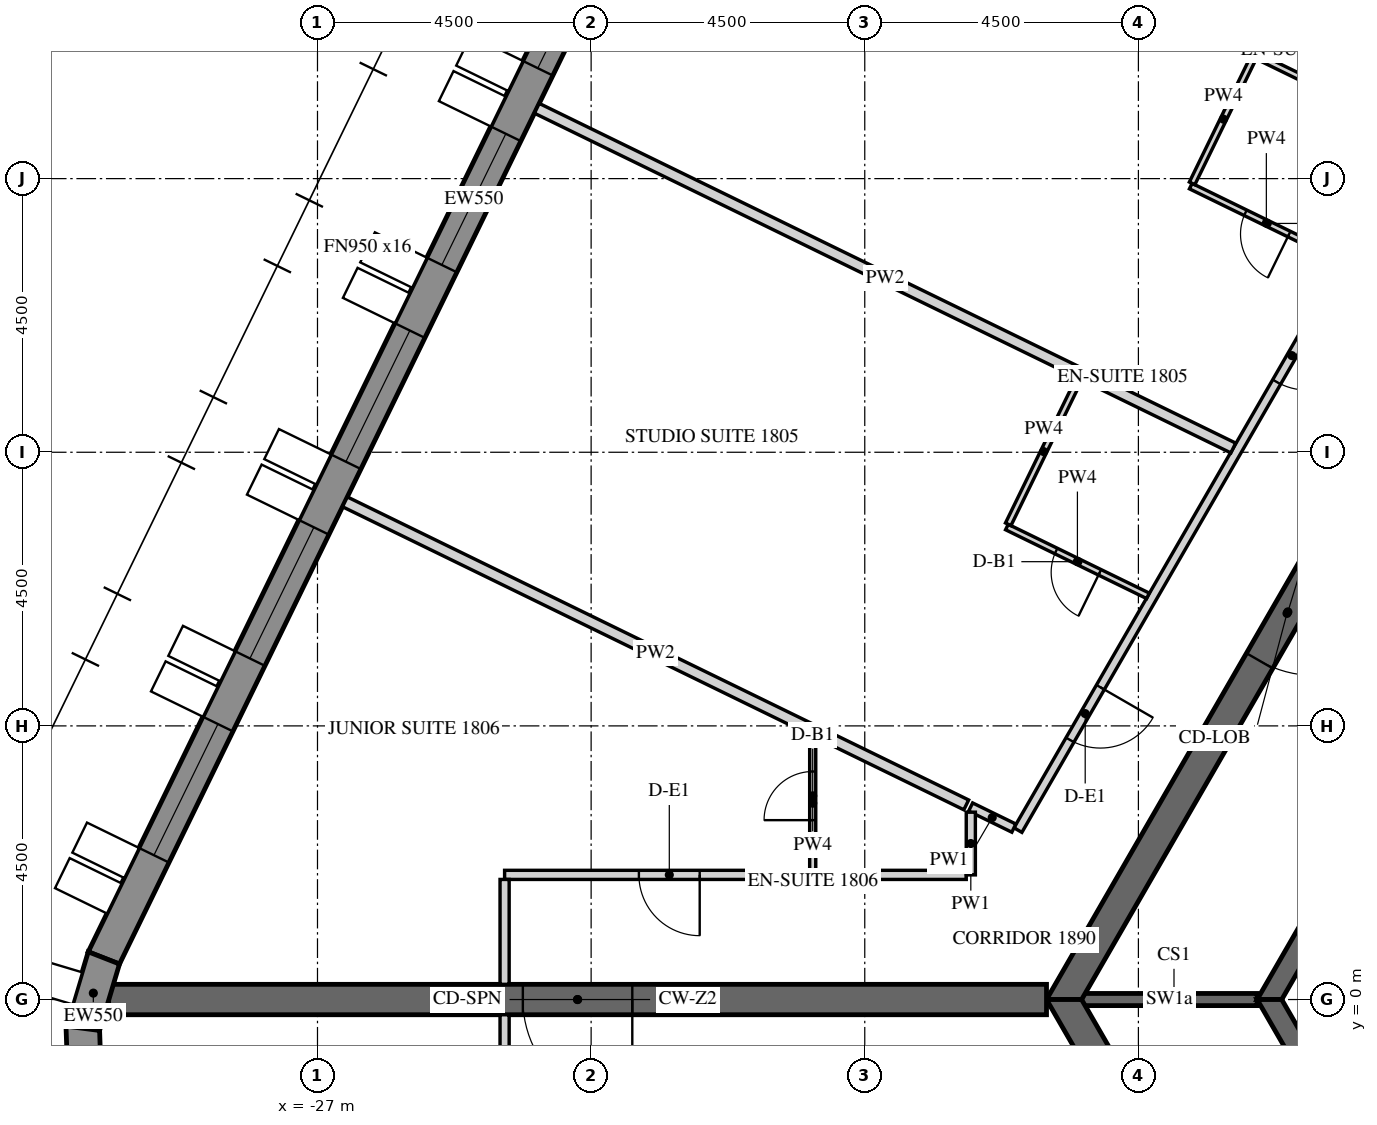
"""IFC4 building model, lengths in metres.
Left out: names, types, materials, properties, quantities, classifications, styles, units other than length and angle.
Written with IfcOpenShell. Run it as: python <this file> out.ifc"""

import sys

from ifc_helpers import new_model, si_unit, direction, frame, frame_2d, origin, place, context, subcontext, project, spatial, polyline, rectangle, outline, extrude, element, fill, save


model = new_model("IFC4")
c1 = context("Model", 3, precision=1e-05, world=origin(), true_north=direction((0.0, 1.0)))
c2 = subcontext(c1, "Body", "Model", "MODEL_VIEW")
j1 = project(units=[si_unit("LENGTHUNIT", "METRE"), si_unit("PLANEANGLEUNIT", "RADIAN")], contexts=[c1])
p1 = place(None, origin())
s1 = spatial("IfcSite", under=j1, at=p1, CompositionType="ELEMENT")
p2 = place(p1, origin())
s2 = spatial("IfcBuilding", under=s1, at=p2, CompositionType="ELEMENT")
p3 = place(p2, frame((0.0, 0.0, 226.8)))
s3 = spatial("IfcBuildingStorey", under=s2, at=p3, CompositionType="ELEMENT", Elevation=226.8)
p4 = place(p3, frame((-18.345, 25.633, -0.15), z_axis=(0.0, 0.0, 1.0), x_axis=(-0.43837181828, -0.898793718791, 0.0)))
e1 = element("IfcWall", 1, at=p4, inside=s3, PredefinedType="SOLIDWALL", context=c2, shape_type="SweptSolid", body=[
    extrude(outline(polyline([(-0.026, -0.275), (27.78, -0.275), (27.735, 0.275), (0.026, 0.275), (-0.026, -0.275)])), origin(), (0.0, 0.0, 1.0), 3.9),
])
p5 = place(p4, frame((1.879, 0.0, 1.05)))
e2 = element("IfcOpeningElement", 2, at=p5, cuts=e1, PredefinedType="OPENING", context=c2, shape_type="SweptSolid", body=[
    extrude(rectangle(XDim=2.4, YDim=2.4, at=frame_2d((1.2, 1.2))), frame((0.0, 0.285, 0.0), z_axis=(0.0, -1.0, 0.0), x_axis=(1.0, 0.0, 0.0)), (0.0, 0.0, 1.0), 0.57),
])
p6 = place(p4, frame((5.479, 0.0, 1.05)))
e3 = element("IfcOpeningElement", 3, at=p6, cuts=e1, PredefinedType="OPENING", context=c2, shape_type="SweptSolid", body=[
    extrude(rectangle(XDim=2.4, YDim=2.4, at=frame_2d((1.2, 1.2))), frame((0.0, 0.285, 0.0), z_axis=(0.0, -1.0, 0.0), x_axis=(1.0, 0.0, 0.0)), (0.0, 0.0, 1.0), 0.57),
])
p7 = place(p4, frame((9.079, 0.0, 1.05)))
e4 = element("IfcOpeningElement", 4, at=p7, cuts=e1, PredefinedType="OPENING", context=c2, shape_type="SweptSolid", body=[
    extrude(rectangle(XDim=2.4, YDim=2.4, at=frame_2d((1.2, 1.2))), frame((0.0, 0.285, 0.0), z_axis=(0.0, -1.0, 0.0), x_axis=(1.0, 0.0, 0.0)), (0.0, 0.0, 1.0), 0.57),
])
p8 = place(p4, frame((12.679, 0.0, 1.05)))
e5 = element("IfcOpeningElement", 5, at=p8, cuts=e1, PredefinedType="OPENING", context=c2, shape_type="SweptSolid", body=[
    extrude(rectangle(XDim=2.4, YDim=2.4, at=frame_2d((1.2, 1.2))), frame((0.0, 0.285, 0.0), z_axis=(0.0, -1.0, 0.0), x_axis=(1.0, 0.0, 0.0)), (0.0, 0.0, 1.0), 0.57),
])
p9 = place(p4, frame((16.279, 0.0, 1.05)))
e6 = element("IfcOpeningElement", 6, at=p9, cuts=e1, PredefinedType="OPENING", context=c2, shape_type="SweptSolid", body=[
    extrude(rectangle(XDim=2.4, YDim=2.4, at=frame_2d((1.2, 1.2))), frame((0.0, 0.285, 0.0), z_axis=(0.0, -1.0, 0.0), x_axis=(1.0, 0.0, 0.0)), (0.0, 0.0, 1.0), 0.57),
])
p10 = place(p4, frame((19.879, 0.0, 1.05)))
e7 = element("IfcOpeningElement", 7, at=p10, cuts=e1, PredefinedType="OPENING", context=c2, shape_type="SweptSolid", body=[
    extrude(rectangle(XDim=2.4, YDim=2.4, at=frame_2d((1.2, 1.2))), frame((0.0, 0.285, 0.0), z_axis=(0.0, -1.0, 0.0), x_axis=(1.0, 0.0, 0.0)), (0.0, 0.0, 1.0), 0.57),
])
p11 = place(p4, frame((23.479, 0.0, 1.05)))
e8 = element("IfcOpeningElement", 8, at=p11, cuts=e1, PredefinedType="OPENING", context=c2, shape_type="SweptSolid", body=[
    extrude(rectangle(XDim=2.4, YDim=2.4, at=frame_2d((1.2, 1.2))), frame((0.0, 0.285, 0.0), z_axis=(0.0, -1.0, 0.0), x_axis=(1.0, 0.0, 0.0)), (0.0, 0.0, 1.0), 0.57),
])
p12 = place(p3, frame((-30.513, 0.684, -0.15), z_axis=(0.0, 0.0, 1.0), x_axis=(-0.286736058109, -0.958009620505, 0.0)))
e9 = element("IfcWall", 9, at=p12, inside=s3, PredefinedType="SOLIDWALL", context=c2, shape_type="SweptSolid", body=[
    extrude(outline(polyline([(-0.022, -0.275), (1.253, -0.275), (1.163, 0.275), (0.022, 0.275), (-0.022, -0.275)])), origin(), (0.0, 0.0, 1.0), 3.9),
])
p13 = place(p3, frame((-30.86, -0.473, -0.15), z_axis=(0.0, 0.0, 1.0), x_axis=(0.03495638276, -0.999388838893, 0.0)))
e10 = element("IfcWall", 10, at=p13, inside=s3, PredefinedType="SOLIDWALL", context=c2, shape_type="SweptSolid", body=[
    extrude(outline(polyline([(-0.045, -0.275), (1.253, -0.275), (1.163, 0.275), (0.045, 0.275), (-0.045, -0.275)])), origin(), (0.0, 0.0, 1.0), 3.9),
])
p14 = place(p3, frame((-7.361, 12.75, -0.15), z_axis=(0.0, 0.0, 1.0), x_axis=(-0.50000571537, -0.866022103989, 0.0)))
e11 = element("IfcWall", 11, at=p14, inside=s3, PredefinedType="SHEAR", context=c2, shape_type="SweptSolid", body=[
    extrude(outline(polyline([(-0.144, -0.25), (14.867, -0.25), (14.578, 0.25), (0.144, 0.25), (-0.144, -0.25)])), origin(), (0.0, 0.0, 1.0), 3.9),
])
p15 = place(p14, frame((6.49, 0.0, 0.15)))
e12 = element("IfcOpeningElement", 12, at=p15, cuts=e11, PredefinedType="OPENING", context=c2, shape_type="SweptSolid", body=[
    extrude(rectangle(XDim=1.8, YDim=2.4, at=frame_2d((0.9, 1.2))), frame((0.0, 0.26, 0.0), z_axis=(0.0, -1.0, 0.0), x_axis=(1.0, 0.0, 0.0)), (0.0, 0.0, 1.0), 0.52),
])
p16 = place(p3, frame((-14.722, 0.0, -0.15), z_axis=(0.0, 0.0, 1.0), x_axis=(0.50000571537, -0.866022103989, 0.0)))
e13 = element("IfcWall", 13, at=p16, inside=s3, PredefinedType="SHEAR", context=c2, shape_type="SweptSolid", body=[
    extrude(outline(polyline([(-0.144, -0.25), (14.867, -0.25), (14.578, 0.25), (0.144, 0.25), (-0.144, -0.25)])), origin(), (0.0, 0.0, 1.0), 3.9),
])
p17 = place(p16, frame((6.432, 0.0, 0.15)))
e14 = element("IfcOpeningElement", 14, at=p17, cuts=e13, PredefinedType="OPENING", context=c2, shape_type="SweptSolid", body=[
    extrude(rectangle(XDim=1.8, YDim=2.4, at=frame_2d((0.9, 1.2))), frame((0.0, 0.26, 0.0), z_axis=(0.0, -1.0, 0.0), x_axis=(1.0, 0.0, 0.0)), (0.0, 0.0, 1.0), 0.52),
])
p18 = place(p3, frame((-15.011, 0.0, -0.15), z_axis=(0.0, 0.0, 1.0), x_axis=(-1.0, 0.0, 0.0)))
e15 = element("IfcWall", 15, at=p18, inside=s3, PredefinedType="SHEAR", context=c2, shape_type="SweptSolid", body=[
    extrude(rectangle(XDim=15.424, YDim=0.5, at=frame_2d((7.712, 0.0))), origin(), (0.0, 0.0, 1.0), 3.9),
])
p19 = place(p18, frame((6.812, 0.0, 0.15)))
e16 = element("IfcOpeningElement", 16, at=p19, cuts=e15, PredefinedType="OPENING", context=c2, shape_type="SweptSolid", body=[
    extrude(rectangle(XDim=1.8, YDim=2.4, at=frame_2d((0.9, 1.2))), frame((0.0, 0.26, 0.0), z_axis=(0.0, -1.0, 0.0), x_axis=(1.0, 0.0, 0.0)), (0.0, 0.0, 1.0), 0.52),
])
p20 = place(p3, frame((-5.673, 9.825, -0.15), z_axis=(0.0, 0.0, 1.0), x_axis=(-0.499995046907, -0.866028263435, 0.0)))
e17 = element("IfcWall", 17, at=p20, inside=s3, PredefinedType="SHEAR", context=c2, shape_type="SweptSolid", body=[
    extrude(outline(polyline([(-0.101, -0.175), (11.446, -0.175), (11.244, 0.175), (0.101, 0.175), (-0.101, -0.175)])), origin(), (0.0, 0.0, 1.0), 3.9),
])
p21 = place(p20, frame((4.801, 0.0, 0.15)))
e18 = element("IfcOpeningElement", 18, at=p21, cuts=e17, PredefinedType="OPENING", context=c2, shape_type="SweptSolid", body=[
    extrude(rectangle(XDim=1.8, YDim=2.4, at=frame_2d((0.9, 1.2))), frame((0.0, 0.185, 0.0), z_axis=(0.0, -1.0, 0.0), x_axis=(1.0, 0.0, 0.0)), (0.0, 0.0, 1.0), 0.37),
])
p22 = place(p3, frame((-11.345, 0.0, -0.15), z_axis=(0.0, 0.0, 1.0), x_axis=(0.499995046907, -0.866028263435, 0.0)))
e19 = element("IfcWall", 19, at=p22, inside=s3, PredefinedType="SHEAR", context=c2, shape_type="SweptSolid", body=[
    extrude(outline(polyline([(-0.101, -0.175), (11.446, -0.175), (11.244, 0.175), (0.101, 0.175), (-0.101, -0.175)])), origin(), (0.0, 0.0, 1.0), 3.9),
])
p23 = place(p22, frame((4.744, 0.0, 0.15)))
e20 = element("IfcOpeningElement", 20, at=p23, cuts=e19, PredefinedType="OPENING", context=c2, shape_type="SweptSolid", body=[
    extrude(rectangle(XDim=1.8, YDim=2.4, at=frame_2d((0.9, 1.2))), frame((0.0, 0.185, 0.0), z_axis=(0.0, -1.0, 0.0), x_axis=(1.0, 0.0, 0.0)), (0.0, 0.0, 1.0), 0.37),
])
p24 = place(p3, frame((-11.547, 0.0, -0.15), z_axis=(0.0, 0.0, 1.0), x_axis=(-1.0, 0.0, 0.0)))
e21 = element("IfcWall", 21, at=p24, inside=s3, PredefinedType="SHEAR", context=c2, shape_type="SweptSolid", body=[
    extrude(rectangle(XDim=2.887, YDim=0.2, at=frame_2d((1.443, 0.0))), origin(), (0.0, 0.0, 1.0), 3.9),
])
p25 = place(p3, frame((-8.588, 14.725, 0.0), z_axis=(0.0, 0.0, 1.0), x_axis=(-0.499999926766, -0.866025446066, 0.0)))
e22 = element("IfcWall", 22, at=p25, inside=s3, PredefinedType="PARTITIONING", context=c2, shape_type="SweptSolid", body=[
    extrude(rectangle(XDim=13.786, YDim=0.15, at=frame_2d((6.893, 0.0))), origin(), (0.0, 0.0, 1.0), 2.988),
])
p26 = place(p25, frame((4.276, 0.0, 0.0)))
e23 = element("IfcOpeningElement", 23, at=p26, cuts=e22, PredefinedType="OPENING", context=c2, shape_type="SweptSolid", body=[
    extrude(rectangle(XDim=1.0, YDim=2.1, at=frame_2d((0.5, 1.05))), frame((0.0, 0.085, 0.0), z_axis=(0.0, -1.0, 0.0), x_axis=(1.0, 0.0, 0.0)), (0.0, 0.0, 1.0), 0.17),
])
p27 = place(p25, frame((11.073, 0.0, 0.0)))
e24 = element("IfcOpeningElement", 24, at=p27, cuts=e22, PredefinedType="OPENING", context=c2, shape_type="SweptSolid", body=[
    extrude(rectangle(XDim=1.0, YDim=2.1, at=frame_2d((0.5, 1.05))), frame((0.0, 0.085, 0.0), z_axis=(0.0, -1.0, 0.0), x_axis=(1.0, 0.0, 0.0)), (0.0, 0.0, 1.0), 0.17),
])
p28 = place(p3, frame((-15.548, 2.819, 0.0), z_axis=(0.0, 0.0, 1.0), x_axis=(-0.898827767233, 0.438302001879, 0.0)))
e25 = element("IfcWall", 25, at=p28, inside=s3, PredefinedType="PARTITIONING", context=c2, shape_type="SweptSolid", body=[
    extrude(rectangle(XDim=0.791, YDim=0.15, at=frame_2d((0.396, 0.0))), origin(), (0.0, 0.0, 1.0), 2.988),
])
p29 = place(p3, frame((-16.331, 2.05, 0.0), z_axis=(0.0, 0.0, 1.0), x_axis=(-1.0, 0.0, 0.0)))
e26 = element("IfcWall", 26, at=p29, inside=s3, PredefinedType="PARTITIONING", context=c2, shape_type="SweptSolid", body=[
    extrude(rectangle(XDim=7.592, YDim=0.15, at=frame_2d((3.796, 0.0))), origin(), (0.0, 0.0, 1.0), 2.988),
])
p30 = place(p29, frame((4.384, 0.0, 0.0)))
e27 = element("IfcOpeningElement", 27, at=p30, cuts=e26, PredefinedType="OPENING", context=c2, shape_type="SweptSolid", body=[
    extrude(rectangle(XDim=1.0, YDim=2.1, at=frame_2d((0.5, 1.05))), frame((0.0, 0.085, 0.0), z_axis=(0.0, -1.0, 0.0), x_axis=(1.0, 0.0, 0.0)), (0.0, 0.0, 1.0), 0.17),
])
p31 = place(p3, frame((-23.923, 1.975, 0.0), z_axis=(0.0, 0.0, 1.0), x_axis=(0.0, -1.0, 0.0)))
e28 = element("IfcWall", 28, at=p31, inside=s3, PredefinedType="PARTITIONING", context=c2, shape_type="SweptSolid", body=[
    extrude(rectangle(XDim=1.725, YDim=0.15, at=frame_2d((0.863, 0.0))), origin(), (0.0, 0.0, 1.0), 2.988),
])
p32 = place(p3, frame((-16.256, 3.081, 0.0), z_axis=(0.0, 0.0, 1.0), x_axis=(0.0, -1.0, 0.0)))
e29 = element("IfcWall", 29, at=p32, inside=s3, PredefinedType="PARTITIONING", context=c2, shape_type="SweptSolid", body=[
    extrude(rectangle(XDim=1.031, YDim=0.15, at=frame_2d((0.516, 0.0))), origin(), (0.0, 0.0, 1.0), 2.988),
])
p33 = place(p3, frame((-23.923, -0.25, 0.0), z_axis=(0.0, 0.0, 1.0), x_axis=(0.0, -1.0, 0.0)))
e30 = element("IfcWall", 30, at=p33, inside=s3, PredefinedType="PARTITIONING", context=c2, shape_type="SweptSolid", body=[
    extrude(rectangle(XDim=1.8, YDim=0.15, at=frame_2d((0.9, 0.0))), origin(), (0.0, 0.0, 1.0), 2.988),
])
p34 = place(p3, frame((-16.791, 26.871, 0.0), z_axis=(0.0, 0.0, 1.0), x_axis=(0.529927950822, -0.848042668111, 0.0)))
e31 = element("IfcWall", 31, at=p34, inside=s3, PredefinedType="PARTITIONING", context=c2, shape_type="SweptSolid", body=[
    extrude(rectangle(XDim=14.839, YDim=0.18, at=frame_2d((7.419, 0.0))), origin(), (0.0, 0.0, 1.0), 2.988),
])
p35 = place(p3, frame((-10.153, 12.164, 0.0), z_axis=(0.0, 0.0, 1.0), x_axis=(-0.898780323471, 0.438399281638, 0.0)))
e32 = element("IfcWall", 32, at=p35, inside=s3, PredefinedType="PARTITIONING", context=c2, shape_type="SweptSolid", body=[
    extrude(rectangle(XDim=2.766, YDim=0.1, at=frame_2d((1.383, 0.0))), origin(), (0.0, 0.0, 1.0), 2.988),
])
p36 = place(p35, frame((0.966, 0.0, 0.0)))
e33 = element("IfcOpeningElement", 33, at=p36, cuts=e32, PredefinedType="OPENING", context=c2, shape_type="SweptSolid", body=[
    extrude(rectangle(XDim=0.8, YDim=2.1, at=frame_2d((0.4, 1.05))), frame((0.0, 0.06, 0.0), z_axis=(0.0, -1.0, 0.0), x_axis=(1.0, 0.0, 0.0)), (0.0, 0.0, 1.0), 0.12),
])
p37 = place(p3, frame((-12.617, 13.422, 0.0), z_axis=(0.0, 0.0, 1.0), x_axis=(0.438298773825, 0.898829341345, 0.0)))
e34 = element("IfcWall", 34, at=p37, inside=s3, PredefinedType="PARTITIONING", context=c2, shape_type="SweptSolid", body=[
    extrude(rectangle(XDim=2.35, YDim=0.1, at=frame_2d((1.175, 0.0))), origin(), (0.0, 0.0, 1.0), 2.988),
])
p38 = place(p3, frame((-11.542, 15.512, 0.0), z_axis=(0.0, 0.0, 1.0), x_axis=(0.898813033265, -0.438332215599, 0.0)))
e35 = element("IfcWall", 35, at=p38, inside=s3, PredefinedType="PARTITIONING", context=c2, shape_type="SweptSolid", body=[
    extrude(rectangle(XDim=2.789, YDim=0.1, at=frame_2d((1.395, 0.0))), origin(), (0.0, 0.0, 1.0), 2.988),
])
p39 = place(p3, frame((-23.393, 14.656, 0.0), z_axis=(0.0, 0.0, 1.0), x_axis=(0.898790356386, -0.438378712152, 0.0)))
e36 = element("IfcWall", 36, at=p39, inside=s3, PredefinedType="PARTITIONING", context=c2, shape_type="SweptSolid", body=[
    extrude(rectangle(XDim=12.743, YDim=0.18, at=frame_2d((6.372, 0.0))), origin(), (0.0, 0.0, 1.0), 2.988),
])
p40 = place(p3, frame((-13.343, 6.639, 0.0), z_axis=(0.0, 0.0, 1.0), x_axis=(-0.898792082907, 0.438375172318, 0.0)))
e37 = element("IfcWall", 37, at=p40, inside=s3, PredefinedType="PARTITIONING", context=c2, shape_type="SweptSolid", body=[
    extrude(rectangle(XDim=2.581, YDim=0.1, at=frame_2d((1.291, 0.0))), origin(), (0.0, 0.0, 1.0), 2.988),
])
p41 = place(p40, frame((0.881, 0.0, 0.0)))
e38 = element("IfcOpeningElement", 38, at=p41, cuts=e37, PredefinedType="OPENING", context=c2, shape_type="SweptSolid", body=[
    extrude(rectangle(XDim=0.8, YDim=2.1, at=frame_2d((0.4, 1.05))), frame((0.0, 0.06, 0.0), z_axis=(0.0, -1.0, 0.0), x_axis=(1.0, 0.0, 0.0)), (0.0, 0.0, 1.0), 0.12),
])
p42 = place(p3, frame((-15.641, 7.815, 0.0), z_axis=(0.0, 0.0, 1.0), x_axis=(0.438380229518, 0.898789616299, 0.0)))
e39 = element("IfcWall", 39, at=p42, inside=s3, PredefinedType="PARTITIONING", context=c2, shape_type="SweptSolid", body=[
    extrude(rectangle(XDim=2.66, YDim=0.1, at=frame_2d((1.33, 0.0))), origin(), (0.0, 0.0, 1.0), 2.988),
])
p43 = place(p3, frame((-26.549, 8.185, 0.0), z_axis=(0.0, 0.0, 1.0), x_axis=(0.898794655758, -0.438369897211, 0.0)))
e40 = element("IfcWall", 40, at=p43, inside=s3, PredefinedType="PARTITIONING", context=c2, shape_type="SweptSolid", body=[
    extrude(rectangle(XDim=11.369, YDim=0.18, at=frame_2d((5.684, 0.0))), origin(), (0.0, 0.0, 1.0), 2.988),
])
p44 = place(p3, frame((-18.856, 2.125, 0.0), z_axis=(0.0, 0.0, 1.0), x_axis=(0.0, 1.0, 0.0)))
e41 = element("IfcWall", 41, at=p44, inside=s3, PredefinedType="PARTITIONING", context=c2, shape_type="SweptSolid", body=[
    extrude(rectangle(XDim=2.207, YDim=0.1, at=frame_2d((1.104, 0.0))), origin(), (0.0, 0.0, 1.0), 2.988),
])
p45 = place(p44, frame((0.825, 0.0, 0.0)))
e42 = element("IfcOpeningElement", 42, at=p45, cuts=e41, PredefinedType="OPENING", context=c2, shape_type="SweptSolid", body=[
    extrude(rectangle(XDim=0.8, YDim=2.1, at=frame_2d((0.4, 1.05))), frame((0.0, 0.06, 0.0), z_axis=(0.0, -1.0, 0.0), x_axis=(1.0, 0.0, 0.0)), (0.0, 0.0, 1.0), 0.12),
])
p46 = place(p7, frame((0.0, 0.205, 0.0)))
e43 = element("IfcWindow", 43, at=p46, inside=s3, PartitioningType="DOUBLE_PANEL_VERTICAL", PredefinedType="WINDOW", context=c2, shape_type="SweptSolid", body=[
    extrude(rectangle(XDim=2.4, YDim=2.4, at=frame_2d((1.2, 1.2))), frame((0.0, 0.03, 0.0), z_axis=(0.0, -1.0, 0.0), x_axis=(1.0, 0.0, 0.0)), (0.0, 0.0, 1.0), 0.06),
])
fill(e4, e43)
p47 = place(p8, frame((0.0, 0.205, 0.0)))
e44 = element("IfcWindow", 44, at=p47, inside=s3, PartitioningType="DOUBLE_PANEL_VERTICAL", PredefinedType="WINDOW", context=c2, shape_type="SweptSolid", body=[
    extrude(rectangle(XDim=2.4, YDim=2.4, at=frame_2d((1.2, 1.2))), frame((0.0, 0.03, 0.0), z_axis=(0.0, -1.0, 0.0), x_axis=(1.0, 0.0, 0.0)), (0.0, 0.0, 1.0), 0.06),
])
fill(e5, e44)
p48 = place(p9, frame((0.0, 0.205, 0.0)))
e45 = element("IfcWindow", 45, at=p48, inside=s3, PartitioningType="DOUBLE_PANEL_VERTICAL", PredefinedType="WINDOW", context=c2, shape_type="SweptSolid", body=[
    extrude(rectangle(XDim=2.4, YDim=2.4, at=frame_2d((1.2, 1.2))), frame((0.0, 0.03, 0.0), z_axis=(0.0, -1.0, 0.0), x_axis=(1.0, 0.0, 0.0)), (0.0, 0.0, 1.0), 0.06),
])
fill(e6, e45)
p49 = place(p10, frame((0.0, 0.205, 0.0)))
e46 = element("IfcWindow", 46, at=p49, inside=s3, PartitioningType="DOUBLE_PANEL_VERTICAL", PredefinedType="WINDOW", context=c2, shape_type="SweptSolid", body=[
    extrude(rectangle(XDim=2.4, YDim=2.4, at=frame_2d((1.2, 1.2))), frame((0.0, 0.03, 0.0), z_axis=(0.0, -1.0, 0.0), x_axis=(1.0, 0.0, 0.0)), (0.0, 0.0, 1.0), 0.06),
])
fill(e7, e46)
p50 = place(p11, frame((0.0, 0.205, 0.0)))
e47 = element("IfcWindow", 47, at=p50, inside=s3, PartitioningType="DOUBLE_PANEL_VERTICAL", PredefinedType="WINDOW", context=c2, shape_type="SweptSolid", body=[
    extrude(rectangle(XDim=2.4, YDim=2.4, at=frame_2d((1.2, 1.2))), frame((0.0, 0.03, 0.0), z_axis=(0.0, -1.0, 0.0), x_axis=(1.0, 0.0, 0.0)), (0.0, 0.0, 1.0), 0.06),
])
fill(e8, e47)
p51 = place(p15, origin())
e48 = element("IfcDoor", 48, at=p51, inside=s3, OperationType="DOUBLE_DOOR_SINGLE_SWING", PredefinedType="DOOR", context=c2, shape_type="SweptSolid", body=[
    extrude(rectangle(XDim=1.8, YDim=2.4, at=frame_2d((0.9, 1.2))), frame((0.0, 0.025, 0.0), z_axis=(0.0, -1.0, 0.0), x_axis=(1.0, 0.0, 0.0)), (0.0, 0.0, 1.0), 0.05),
])
fill(e12, e48)
p52 = place(p19, origin())
e49 = element("IfcDoor", 49, at=p52, inside=s3, OperationType="DOUBLE_DOOR_SINGLE_SWING", PredefinedType="DOOR", context=c2, shape_type="SweptSolid", body=[
    extrude(rectangle(XDim=1.8, YDim=2.4, at=frame_2d((0.9, 1.2))), frame((0.0, 0.025, 0.0), z_axis=(0.0, -1.0, 0.0), x_axis=(1.0, 0.0, 0.0)), (0.0, 0.0, 1.0), 0.05),
])
fill(e16, e49)
p53 = place(p26, origin())
e50 = element("IfcDoor", 50, at=p53, inside=s3, OperationType="SINGLE_SWING_LEFT", PredefinedType="DOOR", context=c2, shape_type="SweptSolid", body=[
    extrude(rectangle(XDim=1.0, YDim=2.1, at=frame_2d((0.5, 1.05))), frame((0.0, 0.025, 0.0), z_axis=(0.0, -1.0, 0.0), x_axis=(1.0, 0.0, 0.0)), (0.0, 0.0, 1.0), 0.05),
])
fill(e23, e50)
p54 = place(p36, origin())
e51 = element("IfcDoor", 51, at=p54, inside=s3, OperationType="SINGLE_SWING_LEFT", PredefinedType="DOOR", context=c2, shape_type="SweptSolid", body=[
    extrude(rectangle(XDim=0.8, YDim=2.1, at=frame_2d((0.4, 1.05))), frame((0.0, 0.025, 0.0), z_axis=(0.0, -1.0, 0.0), x_axis=(1.0, 0.0, 0.0)), (0.0, 0.0, 1.0), 0.05),
])
fill(e33, e51)
p55 = place(p27, origin())
e52 = element("IfcDoor", 52, at=p55, inside=s3, OperationType="SINGLE_SWING_LEFT", PredefinedType="DOOR", context=c2, shape_type="SweptSolid", body=[
    extrude(rectangle(XDim=1.0, YDim=2.1, at=frame_2d((0.5, 1.05))), frame((0.0, 0.025, 0.0), z_axis=(0.0, -1.0, 0.0), x_axis=(1.0, 0.0, 0.0)), (0.0, 0.0, 1.0), 0.05),
])
fill(e24, e52)
p56 = place(p41, origin())
e53 = element("IfcDoor", 53, at=p56, inside=s3, OperationType="SINGLE_SWING_RIGHT", PredefinedType="DOOR", context=c2, shape_type="SweptSolid", body=[
    extrude(rectangle(XDim=0.8, YDim=2.1, at=frame_2d((0.4, 1.05))), frame((0.0, 0.025, 0.0), z_axis=(0.0, -1.0, 0.0), x_axis=(1.0, 0.0, 0.0)), (0.0, 0.0, 1.0), 0.05),
])
fill(e38, e53)
p57 = place(p30, origin())
e54 = element("IfcDoor", 54, at=p57, inside=s3, OperationType="SINGLE_SWING_RIGHT", PredefinedType="DOOR", context=c2, shape_type="SweptSolid", body=[
    extrude(rectangle(XDim=1.0, YDim=2.1, at=frame_2d((0.5, 1.05))), frame((0.0, 0.025, 0.0), z_axis=(0.0, -1.0, 0.0), x_axis=(1.0, 0.0, 0.0)), (0.0, 0.0, 1.0), 0.05),
])
fill(e27, e54)
p58 = place(p45, origin())
e55 = element("IfcDoor", 55, at=p58, inside=s3, OperationType="SINGLE_SWING_LEFT", PredefinedType="DOOR", context=c2, shape_type="SweptSolid", body=[
    extrude(rectangle(XDim=0.8, YDim=2.1, at=frame_2d((0.4, 1.05))), frame((0.0, 0.025, 0.0), z_axis=(0.0, -1.0, 0.0), x_axis=(1.0, 0.0, 0.0)), (0.0, 0.0, 1.0), 0.05),
])
fill(e42, e55)
save(model, sys.argv[1])
